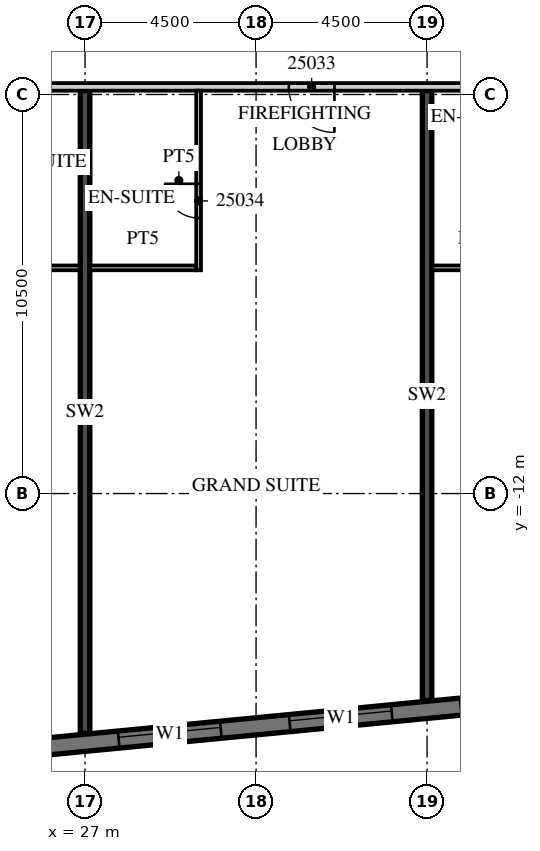
"""IFC4 building model, lengths in metres.
Left out: names, types, materials, properties, quantities, classifications, styles, units other than length and angle.
Written with IfcOpenShell. Run it as: python <this file> out.ifc"""

import sys

from ifc_helpers import new_model, si_unit, direction, frame, frame_2d, origin, place, context, subcontext, project, spatial, rectangle, extrude, element, fill, save


model = new_model("IFC4")
c1 = context("Model", 3, precision=1e-05, world=origin(), true_north=direction((0.0, 1.0)))
c2 = subcontext(c1, "Body", "Model", "MODEL_VIEW")
j1 = project(units=[si_unit("LENGTHUNIT", "METRE"), si_unit("PLANEANGLEUNIT", "RADIAN")], contexts=[c1])
p1 = place(None, origin())
s1 = spatial("IfcSite", under=j1, at=p1, CompositionType="ELEMENT")
p2 = place(p1, origin())
s2 = spatial("IfcBuilding", under=s1, at=p2, CompositionType="ELEMENT")
p3 = place(p2, frame((0.0, 0.0, 117.4)))
s3 = spatial("IfcBuildingStorey", under=s2, at=p3, CompositionType="ELEMENT", Elevation=117.4)
p4 = place(p3, frame((27.0, -18.311, 0.0), z_axis=(0.0, 0.0, 1.0), x_axis=(0.0, 1.0, 0.0)))
e1 = element("IfcWall", 1, at=p4, inside=s3, PredefinedType="SHEAR", context=c2, shape_type="SweptSolid", body=[
    extrude(rectangle(XDim=16.911, YDim=0.25, at=frame_2d((8.455, 0.0))), origin(), (0.0, 0.0, 1.0), 3.3),
])
p5 = place(p3, frame((36.0, -17.444, 0.0), z_axis=(0.0, 0.0, 1.0), x_axis=(0.0, 1.0, 0.0)))
e2 = element("IfcWall", 2, at=p5, inside=s3, PredefinedType="SHEAR", context=c2, shape_type="SweptSolid", body=[
    extrude(rectangle(XDim=16.044, YDim=0.25, at=frame_2d((8.022, 0.0))), origin(), (0.0, 0.0, 1.0), 3.3),
])
p6 = place(p3, frame((-13.521, -22.46, 0.0), z_axis=(0.0, 0.0, 1.0), x_axis=(0.995396096335, 0.095846812164, 0.0)))
e3 = element("IfcWall", 3, at=p6, inside=s3, PredefinedType="SOLIDWALL", context=c2, shape_type="SweptSolid", body=[
    extrude(rectangle(XDim=59.151, YDim=0.45, at=frame_2d((29.575, 0.0))), origin(), (0.0, 0.0, 1.0), 3.02),
])
p7 = place(p6, frame((0.91, 0.0, 0.45)))
e4 = element("IfcOpeningElement", 4, at=p7, cuts=e3, PredefinedType="OPENING", context=c2, shape_type="SweptSolid", body=[
    extrude(rectangle(XDim=2.7, YDim=2.25, at=frame_2d((1.35, 1.125))), frame((0.0, 0.235, 0.0), z_axis=(0.0, -1.0, 0.0), x_axis=(1.0, 0.0, 0.0)), (0.0, 0.0, 1.0), 0.47),
])
p8 = place(p6, frame((5.431, 0.0, 0.45)))
e5 = element("IfcOpeningElement", 5, at=p8, cuts=e3, PredefinedType="OPENING", context=c2, shape_type="SweptSolid", body=[
    extrude(rectangle(XDim=2.7, YDim=2.25, at=frame_2d((1.35, 1.125))), frame((0.0, 0.235, 0.0), z_axis=(0.0, -1.0, 0.0), x_axis=(1.0, 0.0, 0.0)), (0.0, 0.0, 1.0), 0.47),
])
p9 = place(p6, frame((9.952, 0.0, 0.45)))
e6 = element("IfcOpeningElement", 6, at=p9, cuts=e3, PredefinedType="OPENING", context=c2, shape_type="SweptSolid", body=[
    extrude(rectangle(XDim=2.7, YDim=2.25, at=frame_2d((1.35, 1.125))), frame((0.0, 0.235, 0.0), z_axis=(0.0, -1.0, 0.0), x_axis=(1.0, 0.0, 0.0)), (0.0, 0.0, 1.0), 0.47),
])
p10 = place(p6, frame((14.473, 0.0, 0.45)))
e7 = element("IfcOpeningElement", 7, at=p10, cuts=e3, PredefinedType="OPENING", context=c2, shape_type="SweptSolid", body=[
    extrude(rectangle(XDim=2.7, YDim=2.25, at=frame_2d((1.35, 1.125))), frame((0.0, 0.235, 0.0), z_axis=(0.0, -1.0, 0.0), x_axis=(1.0, 0.0, 0.0)), (0.0, 0.0, 1.0), 0.47),
])
p11 = place(p6, frame((18.994, 0.0, 0.45)))
e8 = element("IfcOpeningElement", 8, at=p11, cuts=e3, PredefinedType="OPENING", context=c2, shape_type="SweptSolid", body=[
    extrude(rectangle(XDim=2.7, YDim=2.25, at=frame_2d((1.35, 1.125))), frame((0.0, 0.235, 0.0), z_axis=(0.0, -1.0, 0.0), x_axis=(1.0, 0.0, 0.0)), (0.0, 0.0, 1.0), 0.47),
])
p12 = place(p6, frame((23.514, 0.0, 0.45)))
e9 = element("IfcOpeningElement", 9, at=p12, cuts=e3, PredefinedType="OPENING", context=c2, shape_type="SweptSolid", body=[
    extrude(rectangle(XDim=2.7, YDim=2.25, at=frame_2d((1.35, 1.125))), frame((0.0, 0.235, 0.0), z_axis=(0.0, -1.0, 0.0), x_axis=(1.0, 0.0, 0.0)), (0.0, 0.0, 1.0), 0.47),
])
p13 = place(p6, frame((28.035, 0.0, 0.45)))
e10 = element("IfcOpeningElement", 10, at=p13, cuts=e3, PredefinedType="OPENING", context=c2, shape_type="SweptSolid", body=[
    extrude(rectangle(XDim=2.7, YDim=2.25, at=frame_2d((1.35, 1.125))), frame((0.0, 0.235, 0.0), z_axis=(0.0, -1.0, 0.0), x_axis=(1.0, 0.0, 0.0)), (0.0, 0.0, 1.0), 0.47),
])
p14 = place(p6, frame((32.556, 0.0, 0.45)))
e11 = element("IfcOpeningElement", 11, at=p14, cuts=e3, PredefinedType="OPENING", context=c2, shape_type="SweptSolid", body=[
    extrude(rectangle(XDim=2.7, YDim=2.25, at=frame_2d((1.35, 1.125))), frame((0.0, 0.235, 0.0), z_axis=(0.0, -1.0, 0.0), x_axis=(1.0, 0.0, 0.0)), (0.0, 0.0, 1.0), 0.47),
])
p15 = place(p6, frame((37.077, 0.0, 0.45)))
e12 = element("IfcOpeningElement", 12, at=p15, cuts=e3, PredefinedType="OPENING", context=c2, shape_type="SweptSolid", body=[
    extrude(rectangle(XDim=2.7, YDim=2.25, at=frame_2d((1.35, 1.125))), frame((0.0, 0.235, 0.0), z_axis=(0.0, -1.0, 0.0), x_axis=(1.0, 0.0, 0.0)), (0.0, 0.0, 1.0), 0.47),
])
p16 = place(p6, frame((41.598, 0.0, 0.45)))
e13 = element("IfcOpeningElement", 13, at=p16, cuts=e3, PredefinedType="OPENING", context=c2, shape_type="SweptSolid", body=[
    extrude(rectangle(XDim=2.7, YDim=2.25, at=frame_2d((1.35, 1.125))), frame((0.0, 0.235, 0.0), z_axis=(0.0, -1.0, 0.0), x_axis=(1.0, 0.0, 0.0)), (0.0, 0.0, 1.0), 0.47),
])
p17 = place(p6, frame((46.118, 0.0, 0.45)))
e14 = element("IfcOpeningElement", 14, at=p17, cuts=e3, PredefinedType="OPENING", context=c2, shape_type="SweptSolid", body=[
    extrude(rectangle(XDim=2.7, YDim=2.25, at=frame_2d((1.35, 1.125))), frame((0.0, 0.235, 0.0), z_axis=(0.0, -1.0, 0.0), x_axis=(1.0, 0.0, 0.0)), (0.0, 0.0, 1.0), 0.47),
])
p18 = place(p6, frame((50.639, 0.0, 0.45)))
e15 = element("IfcOpeningElement", 15, at=p18, cuts=e3, PredefinedType="OPENING", context=c2, shape_type="SweptSolid", body=[
    extrude(rectangle(XDim=2.7, YDim=2.25, at=frame_2d((1.35, 1.125))), frame((0.0, 0.235, 0.0), z_axis=(0.0, -1.0, 0.0), x_axis=(1.0, 0.0, 0.0)), (0.0, 0.0, 1.0), 0.47),
])
p19 = place(p6, frame((55.15, 0.0, 0.45)))
e16 = element("IfcOpeningElement", 16, at=p19, cuts=e3, PredefinedType="OPENING", context=c2, shape_type="SweptSolid", body=[
    extrude(rectangle(XDim=2.7, YDim=2.25, at=frame_2d((1.35, 1.125))), frame((0.0, 0.235, 0.0), z_axis=(0.0, -1.0, 0.0), x_axis=(1.0, 0.0, 0.0)), (0.0, 0.0, 1.0), 0.47),
])
p20 = place(p3, frame((-13.5, -1.3, 0.0), z_axis=(0.0, 0.0, 1.0), x_axis=(1.0, 0.0, 0.0)))
e17 = element("IfcWall", 17, at=p20, inside=s3, PredefinedType="PARTITIONING", context=c2, shape_type="SweptSolid", body=[
    extrude(rectangle(XDim=60.932, YDim=0.2, at=frame_2d((30.466, 0.0))), origin(), (0.0, 0.0, 1.0), 3.02),
])
p21 = place(p20, frame((0.575, 0.0, 0.0)))
e18 = element("IfcOpeningElement", 18, at=p21, cuts=e17, PredefinedType="OPENING", context=c2, shape_type="SweptSolid", body=[
    extrude(rectangle(XDim=1.0, YDim=2.1, at=frame_2d((0.5, 1.05))), frame((0.0, 0.11, 0.0), z_axis=(0.0, -1.0, 0.0), x_axis=(1.0, 0.0, 0.0)), (0.0, 0.0, 1.0), 0.22),
])
p22 = place(p20, frame((5.075, 0.0, 0.0)))
e19 = element("IfcOpeningElement", 19, at=p22, cuts=e17, PredefinedType="OPENING", context=c2, shape_type="SweptSolid", body=[
    extrude(rectangle(XDim=1.0, YDim=2.1, at=frame_2d((0.5, 1.05))), frame((0.0, 0.11, 0.0), z_axis=(0.0, -1.0, 0.0), x_axis=(1.0, 0.0, 0.0)), (0.0, 0.0, 1.0), 0.22),
])
p23 = place(p20, frame((11.925, 0.0, 0.0)))
e20 = element("IfcOpeningElement", 20, at=p23, cuts=e17, PredefinedType="OPENING", context=c2, shape_type="SweptSolid", body=[
    extrude(rectangle(XDim=1.0, YDim=2.1, at=frame_2d((0.5, 1.05))), frame((0.0, 0.11, 0.0), z_axis=(0.0, -1.0, 0.0), x_axis=(1.0, 0.0, 0.0)), (0.0, 0.0, 1.0), 0.22),
])
p24 = place(p20, frame((15.938, 0.0, 0.0)))
e21 = element("IfcOpeningElement", 21, at=p24, cuts=e17, PredefinedType="OPENING", context=c2, shape_type="SweptSolid", body=[
    extrude(rectangle(XDim=1.2, YDim=2.1, at=frame_2d((0.6, 1.05))), frame((0.0, 0.11, 0.0), z_axis=(0.0, -1.0, 0.0), x_axis=(1.0, 0.0, 0.0)), (0.0, 0.0, 1.0), 0.22),
])
p25 = place(p20, frame((25.45, 0.0, 0.0)))
e22 = element("IfcOpeningElement", 22, at=p25, cuts=e17, PredefinedType="OPENING", context=c2, shape_type="SweptSolid", body=[
    extrude(rectangle(XDim=1.0, YDim=2.1, at=frame_2d((0.5, 1.05))), frame((0.0, 0.11, 0.0), z_axis=(0.0, -1.0, 0.0), x_axis=(1.0, 0.0, 0.0)), (0.0, 0.0, 1.0), 0.22),
])
p26 = place(p20, frame((27.55, 0.0, 0.0)))
e23 = element("IfcOpeningElement", 23, at=p26, cuts=e17, PredefinedType="OPENING", context=c2, shape_type="SweptSolid", body=[
    extrude(rectangle(XDim=1.0, YDim=2.1, at=frame_2d((0.5, 1.05))), frame((0.0, 0.11, 0.0), z_axis=(0.0, -1.0, 0.0), x_axis=(1.0, 0.0, 0.0)), (0.0, 0.0, 1.0), 0.22),
])
p27 = place(p20, frame((33.938, 0.0, 0.0)))
e24 = element("IfcOpeningElement", 24, at=p27, cuts=e17, PredefinedType="OPENING", context=c2, shape_type="SweptSolid", body=[
    extrude(rectangle(XDim=1.2, YDim=2.1, at=frame_2d((0.6, 1.05))), frame((0.0, 0.11, 0.0), z_axis=(0.0, -1.0, 0.0), x_axis=(1.0, 0.0, 0.0)), (0.0, 0.0, 1.0), 0.22),
])
p28 = place(p20, frame((45.862, 0.0, 0.0)))
e25 = element("IfcOpeningElement", 25, at=p28, cuts=e17, PredefinedType="OPENING", context=c2, shape_type="SweptSolid", body=[
    extrude(rectangle(XDim=1.2, YDim=2.1, at=frame_2d((0.6, 1.05))), frame((0.0, 0.11, 0.0), z_axis=(0.0, -1.0, 0.0), x_axis=(1.0, 0.0, 0.0)), (0.0, 0.0, 1.0), 0.22),
])
p29 = place(p20, frame((52.425, 0.0, 0.0)))
e26 = element("IfcOpeningElement", 26, at=p29, cuts=e17, PredefinedType="OPENING", context=c2, shape_type="SweptSolid", body=[
    extrude(rectangle(XDim=1.0, YDim=2.1, at=frame_2d((0.5, 1.05))), frame((0.0, 0.11, 0.0), z_axis=(0.0, -1.0, 0.0), x_axis=(1.0, 0.0, 0.0)), (0.0, 0.0, 1.0), 0.22),
])
p30 = place(p20, frame((56.95, 0.0, 0.0)))
e27 = element("IfcOpeningElement", 27, at=p30, cuts=e17, PredefinedType="OPENING", context=c2, shape_type="SweptSolid", body=[
    extrude(rectangle(XDim=1.0, YDim=2.1, at=frame_2d((0.5, 1.05))), frame((0.0, 0.11, 0.0), z_axis=(0.0, -1.0, 0.0), x_axis=(1.0, 0.0, 0.0)), (0.0, 0.0, 1.0), 0.22),
])
p31 = place(p20, frame((59.882, 0.0, 0.0)))
e28 = element("IfcOpeningElement", 28, at=p31, cuts=e17, PredefinedType="OPENING", context=c2, shape_type="SweptSolid", body=[
    extrude(rectangle(XDim=0.9, YDim=2.1, at=frame_2d((0.45, 1.05))), frame((0.0, 0.11, 0.0), z_axis=(0.0, -1.0, 0.0), x_axis=(1.0, 0.0, 0.0)), (0.0, 0.0, 1.0), 0.22),
])
p32 = place(p3, frame((24.075, -6.062, 0.0), z_axis=(0.0, 0.0, 1.0), x_axis=(1.0, 0.0, 0.0)))
e29 = element("IfcWall", 29, at=p32, inside=s3, PredefinedType="PARTITIONING", context=c2, shape_type="SweptSolid", body=[
    extrude(rectangle(XDim=2.8, YDim=0.125, at=frame_2d((1.4, 0.0))), origin(), (0.0, 0.0, 1.0), 3.02),
])
p33 = place(p3, frame((29.988, -6.125, 0.0), z_axis=(0.0, 0.0, 1.0), x_axis=(0.0, 1.0, 0.0)))
e30 = element("IfcWall", 30, at=p33, inside=s3, PredefinedType="PARTITIONING", context=c2, shape_type="SweptSolid", body=[
    extrude(rectangle(XDim=4.725, YDim=0.125, at=frame_2d((2.363, 0.0))), origin(), (0.0, 0.0, 1.0), 3.02),
])
p34 = place(p33, frame((1.375, 0.0, 0.0)))
e31 = element("IfcOpeningElement", 31, at=p34, cuts=e30, PredefinedType="OPENING", context=c2, shape_type="SweptSolid", body=[
    extrude(rectangle(XDim=0.9, YDim=2.1, at=frame_2d((0.45, 1.05))), frame((0.0, 0.073, 0.0), z_axis=(0.0, -1.0, 0.0), x_axis=(1.0, 0.0, 0.0)), (0.0, 0.0, 1.0), 0.145),
])
p35 = place(p3, frame((27.125, -6.062, 0.0), z_axis=(0.0, 0.0, 1.0), x_axis=(1.0, 0.0, 0.0)))
e32 = element("IfcWall", 32, at=p35, inside=s3, PredefinedType="PARTITIONING", context=c2, shape_type="SweptSolid", body=[
    extrude(rectangle(XDim=2.8, YDim=0.125, at=frame_2d((1.4, 0.0))), origin(), (0.0, 0.0, 1.0), 3.02),
])
p36 = place(p3, frame((36.125, -6.062, 0.0), z_axis=(0.0, 0.0, 1.0), x_axis=(1.0, 0.0, 0.0)))
e33 = element("IfcWall", 33, at=p36, inside=s3, PredefinedType="PARTITIONING", context=c2, shape_type="SweptSolid", body=[
    extrude(rectangle(XDim=2.225, YDim=0.125, at=frame_2d((1.113, 0.0))), origin(), (0.0, 0.0, 1.0), 3.02),
])
p37 = place(p16, origin())
e34 = element("IfcWindow", 34, at=p37, inside=s3, PartitioningType="SINGLE_PANEL", PredefinedType="WINDOW", context=c2, shape_type="SweptSolid", body=[
    extrude(rectangle(XDim=2.7, YDim=2.25, at=frame_2d((1.35, 1.125))), frame((0.0, 0.09, 0.0), z_axis=(0.0, -1.0, 0.0), x_axis=(1.0, 0.0, 0.0)), (0.0, 0.0, 1.0), 0.06),
])
fill(e13, e34)
p38 = place(p17, origin())
e35 = element("IfcWindow", 35, at=p38, inside=s3, PartitioningType="SINGLE_PANEL", PredefinedType="WINDOW", context=c2, shape_type="SweptSolid", body=[
    extrude(rectangle(XDim=2.7, YDim=2.25, at=frame_2d((1.35, 1.125))), frame((0.0, 0.09, 0.0), z_axis=(0.0, -1.0, 0.0), x_axis=(1.0, 0.0, 0.0)), (0.0, 0.0, 1.0), 0.06),
])
fill(e14, e35)
p39 = place(p28, origin())
e36 = element("IfcDoor", 36, at=p39, inside=s3, OperationType="SINGLE_SWING_RIGHT", PredefinedType="DOOR", context=c2, shape_type="SweptSolid", body=[
    extrude(rectangle(XDim=1.2, YDim=2.1, at=frame_2d((0.6, 1.05))), frame((0.0, 0.025, 0.0), z_axis=(0.0, -1.0, 0.0), x_axis=(1.0, 0.0, 0.0)), (0.0, 0.0, 1.0), 0.05),
])
fill(e25, e36)
p40 = place(p34, origin())
e37 = element("IfcDoor", 37, at=p40, inside=s3, OperationType="SINGLE_SWING_RIGHT", PredefinedType="DOOR", context=c2, shape_type="SweptSolid", body=[
    extrude(rectangle(XDim=0.9, YDim=2.1, at=frame_2d((0.45, 1.05))), frame((0.0, 0.025, 0.0), z_axis=(0.0, -1.0, 0.0), x_axis=(1.0, 0.0, 0.0)), (0.0, 0.0, 1.0), 0.05),
])
fill(e31, e37)
save(model, sys.argv[1])
